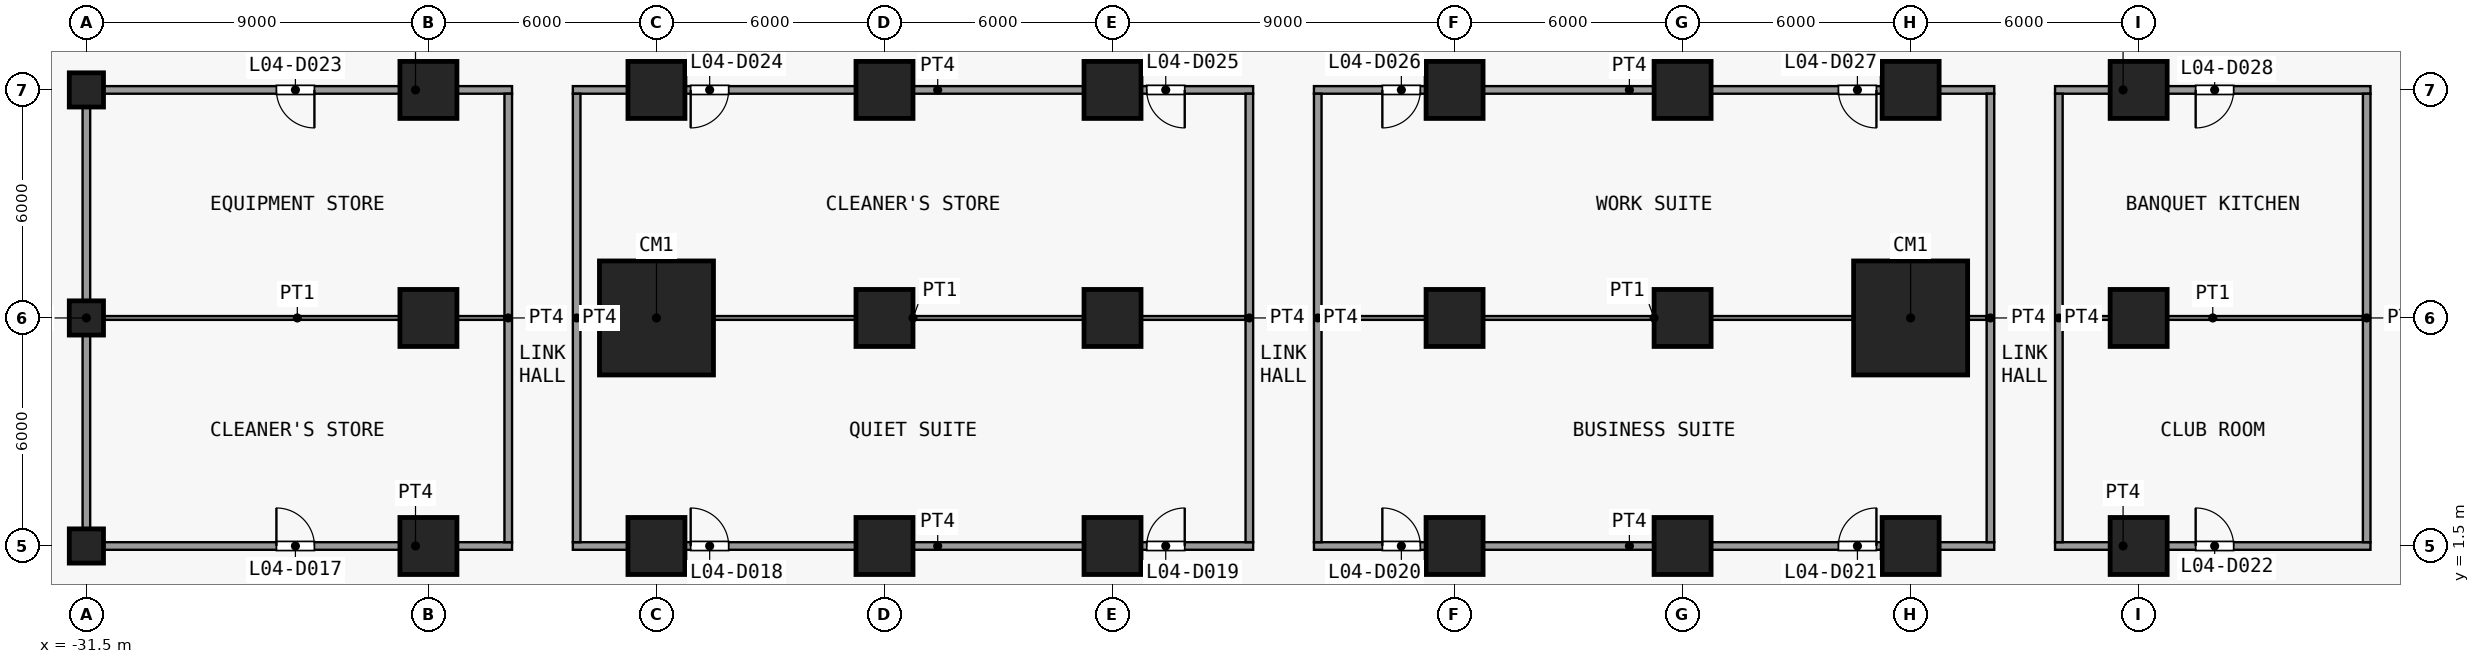
"""IFC4 building model, lengths in metres.
Left out: names, types, materials, properties, quantities, classifications, styles, units other than length and angle.
Written with IfcOpenShell. Run it as: python <this file> out.ifc"""

import sys

from ifc_helpers import new_model, si_unit, direction, frame, frame_2d, origin, origin_2d, place, context, subcontext, project, spatial, rectangle, extrude, element, fill, save


model = new_model("IFC4")
c1 = context("Model", 3, precision=1e-05, world=origin(), true_north=direction((0.0, 1.0)))
c2 = subcontext(c1, "Body", "Model", "MODEL_VIEW")
j1 = project(units=[si_unit("LENGTHUNIT", "METRE"), si_unit("PLANEANGLEUNIT", "RADIAN")], contexts=[c1])
p1 = place(None, origin())
s1 = spatial("IfcSite", under=j1, at=p1, CompositionType="ELEMENT")
p2 = place(p1, origin())
s2 = spatial("IfcBuilding", under=s1, at=p2, CompositionType="ELEMENT")
p3 = place(p2, frame((0.0, 0.0, 23.5)))
s3 = spatial("IfcBuildingStorey", under=s2, at=p3, CompositionType="ELEMENT", Elevation=23.5)
for number, where, z_axis, x_axis in (
    (1, (-31.5, 1.5, 0.0), (0.0, 0.0, 1.0), (1.0, 0.0, 0.0)),
    (2, (-31.5, 7.5, 0.0), (0.0, 0.0, 1.0), (1.0, 0.0, 0.0)),
    (3, (-31.5, 13.5, 0.0), (0.0, 0.0, 1.0), (1.0, 0.0, 0.0)),
):
    element("IfcColumn", number, at=place(p3, frame(where, z_axis=z_axis, x_axis=x_axis)), inside=s3, PredefinedType="COLUMN", context=c2, shape_type="SweptSolid", body=[
        extrude(rectangle(XDim=0.9, YDim=0.9, at=origin_2d()), origin(), (0.0, 0.0, 1.0), 4.5),
    ])
for number, where, z_axis, x_axis in (
    (4, (-22.5, 1.5, 0.0), (0.0, 0.0, 1.0), (1.0, 0.0, 0.0)),
    (5, (-22.5, 7.5, 0.0), (0.0, 0.0, 1.0), (1.0, 0.0, 0.0)),
    (6, (-22.5, 13.5, 0.0), (0.0, 0.0, 1.0), (1.0, 0.0, 0.0)),
    (7, (-16.5, 1.5, 0.0), (0.0, 0.0, 1.0), (1.0, 0.0, 0.0)),
):
    element("IfcColumn", number, at=place(p3, frame(where, z_axis=z_axis, x_axis=x_axis)), inside=s3, PredefinedType="COLUMN", context=c2, shape_type="SweptSolid", body=[
        extrude(rectangle(XDim=1.5, YDim=1.5, at=origin_2d()), origin(), (0.0, 0.0, 1.0), 4.5),
    ])
p4 = place(p3, frame((-16.5, 7.5, 0.0), z_axis=(0.0, 0.0, 1.0), x_axis=(1.0, 0.0, 0.0)))
e8 = element("IfcColumn", 8, at=p4, inside=s3, PredefinedType="COLUMN", context=c2, shape_type="SweptSolid", body=[
    extrude(rectangle(XDim=3.0, YDim=3.0, at=origin_2d()), origin(), (0.0, 0.0, 1.0), 4.5),
])
for number, where, z_axis, x_axis in (
    (9, (-16.5, 13.5, 0.0), (0.0, 0.0, 1.0), (1.0, 0.0, 0.0)),
    (10, (-10.5, 1.5, 0.0), (0.0, 0.0, 1.0), (1.0, 0.0, 0.0)),
    (11, (-10.5, 7.5, 0.0), (0.0, 0.0, 1.0), (1.0, 0.0, 0.0)),
    (12, (-10.5, 13.5, 0.0), (0.0, 0.0, 1.0), (1.0, 0.0, 0.0)),
    (13, (-4.5, 1.5, 0.0), (0.0, 0.0, 1.0), (1.0, 0.0, 0.0)),
    (14, (-4.5, 7.5, 0.0), (0.0, 0.0, 1.0), (1.0, 0.0, 0.0)),
    (15, (-4.5, 13.5, 0.0), (0.0, 0.0, 1.0), (1.0, 0.0, 0.0)),
    (16, (4.5, 1.5, 0.0), (0.0, 0.0, 1.0), (1.0, 0.0, 0.0)),
    (17, (4.5, 7.5, 0.0), (0.0, 0.0, 1.0), (1.0, 0.0, 0.0)),
    (18, (4.5, 13.5, 0.0), (0.0, 0.0, 1.0), (1.0, 0.0, 0.0)),
    (19, (10.5, 1.5, 0.0), (0.0, 0.0, 1.0), (1.0, 0.0, 0.0)),
    (20, (10.5, 7.5, 0.0), (0.0, 0.0, 1.0), (1.0, 0.0, 0.0)),
    (21, (10.5, 13.5, 0.0), (0.0, 0.0, 1.0), (1.0, 0.0, 0.0)),
    (22, (16.5, 1.5, 0.0), (0.0, 0.0, 1.0), (1.0, 0.0, 0.0)),
):
    element("IfcColumn", number, at=place(p3, frame(where, z_axis=z_axis, x_axis=x_axis)), inside=s3, PredefinedType="COLUMN", context=c2, shape_type="SweptSolid", body=[
        extrude(rectangle(XDim=1.5, YDim=1.5, at=origin_2d()), origin(), (0.0, 0.0, 1.0), 4.5),
    ])
p5 = place(p3, frame((16.5, 7.5, 0.0), z_axis=(0.0, 0.0, 1.0), x_axis=(1.0, 0.0, 0.0)))
e23 = element("IfcColumn", 23, at=p5, inside=s3, PredefinedType="COLUMN", context=c2, shape_type="SweptSolid", body=[
    extrude(rectangle(XDim=3.0, YDim=3.0, at=origin_2d()), origin(), (0.0, 0.0, 1.0), 4.5),
])
for number, where, z_axis, x_axis in (
    (24, (16.5, 13.5, 0.0), (0.0, 0.0, 1.0), (1.0, 0.0, 0.0)),
    (25, (22.5, 1.5, 0.0), (0.0, 0.0, 1.0), (1.0, 0.0, 0.0)),
    (26, (22.5, 7.5, 0.0), (0.0, 0.0, 1.0), (1.0, 0.0, 0.0)),
    (27, (22.5, 13.5, 0.0), (0.0, 0.0, 1.0), (1.0, 0.0, 0.0)),
):
    element("IfcColumn", number, at=place(p3, frame(where, z_axis=z_axis, x_axis=x_axis)), inside=s3, PredefinedType="COLUMN", context=c2, shape_type="SweptSolid", body=[
        extrude(rectangle(XDim=1.5, YDim=1.5, at=origin_2d()), origin(), (0.0, 0.0, 1.0), 4.5),
    ])
p6 = place(p3, frame((-31.6, 1.5, 0.0), z_axis=(0.0, 0.0, 1.0), x_axis=(1.0, 0.0, 0.0)))
e28 = element("IfcWall", 28, at=p6, inside=s3, PredefinedType="PARTITIONING", context=c2, shape_type="SweptSolid", body=[
    extrude(rectangle(XDim=11.3, YDim=0.2, at=frame_2d((5.65, 0.0))), origin(), (0.0, 0.0, 1.0), 4.15),
])
p7 = place(p6, frame((5.1, 0.0, 0.0)))
e29 = element("IfcOpeningElement", 29, at=p7, cuts=e28, PredefinedType="OPENING", context=c2, shape_type="SweptSolid", body=[
    extrude(rectangle(XDim=1.0, YDim=2.1, at=frame_2d((0.5, 1.05))), frame((0.0, 0.11, 0.0), z_axis=(0.0, -1.0, 0.0), x_axis=(1.0, 0.0, 0.0)), (0.0, 0.0, 1.0), 0.22),
])
p8 = place(p3, frame((-18.7, 1.5, 0.0), z_axis=(0.0, 0.0, 1.0), x_axis=(1.0, 0.0, 0.0)))
e30 = element("IfcWall", 30, at=p8, inside=s3, PredefinedType="PARTITIONING", context=c2, shape_type="SweptSolid", body=[
    extrude(rectangle(XDim=17.9, YDim=0.2, at=frame_2d((8.95, 0.0))), origin(), (0.0, 0.0, 1.0), 4.15),
])
p9 = place(p8, frame((3.1, 0.0, 0.0)))
e31 = element("IfcOpeningElement", 31, at=p9, cuts=e30, PredefinedType="OPENING", context=c2, shape_type="SweptSolid", body=[
    extrude(rectangle(XDim=1.0, YDim=2.1, at=frame_2d((0.5, 1.05))), frame((0.0, 0.11, 0.0), z_axis=(0.0, -1.0, 0.0), x_axis=(1.0, 0.0, 0.0)), (0.0, 0.0, 1.0), 0.22),
])
p10 = place(p8, frame((15.1, 0.0, 0.0)))
e32 = element("IfcOpeningElement", 32, at=p10, cuts=e30, PredefinedType="OPENING", context=c2, shape_type="SweptSolid", body=[
    extrude(rectangle(XDim=1.0, YDim=2.1, at=frame_2d((0.5, 1.05))), frame((0.0, 0.11, 0.0), z_axis=(0.0, -1.0, 0.0), x_axis=(1.0, 0.0, 0.0)), (0.0, 0.0, 1.0), 0.22),
])
p11 = place(p3, frame((0.8, 1.5, 0.0), z_axis=(0.0, 0.0, 1.0), x_axis=(1.0, 0.0, 0.0)))
e33 = element("IfcWall", 33, at=p11, inside=s3, PredefinedType="PARTITIONING", context=c2, shape_type="SweptSolid", body=[
    extrude(rectangle(XDim=17.9, YDim=0.2, at=frame_2d((8.95, 0.0))), origin(), (0.0, 0.0, 1.0), 4.15),
])
p12 = place(p11, frame((1.8, 0.0, 0.0)))
e34 = element("IfcOpeningElement", 34, at=p12, cuts=e33, PredefinedType="OPENING", context=c2, shape_type="SweptSolid", body=[
    extrude(rectangle(XDim=1.0, YDim=2.1, at=frame_2d((0.5, 1.05))), frame((0.0, 0.11, 0.0), z_axis=(0.0, -1.0, 0.0), x_axis=(1.0, 0.0, 0.0)), (0.0, 0.0, 1.0), 0.22),
])
p13 = place(p11, frame((13.8, 0.0, 0.0)))
e35 = element("IfcOpeningElement", 35, at=p13, cuts=e33, PredefinedType="OPENING", context=c2, shape_type="SweptSolid", body=[
    extrude(rectangle(XDim=1.0, YDim=2.1, at=frame_2d((0.5, 1.05))), frame((0.0, 0.11, 0.0), z_axis=(0.0, -1.0, 0.0), x_axis=(1.0, 0.0, 0.0)), (0.0, 0.0, 1.0), 0.22),
])
p14 = place(p3, frame((20.3, 1.5, 0.0), z_axis=(0.0, 0.0, 1.0), x_axis=(1.0, 0.0, 0.0)))
e36 = element("IfcWall", 36, at=p14, inside=s3, PredefinedType="PARTITIONING", context=c2, shape_type="SweptSolid", body=[
    extrude(rectangle(XDim=8.3, YDim=0.2, at=frame_2d((4.15, 0.0))), origin(), (0.0, 0.0, 1.0), 4.15),
])
p15 = place(p14, frame((3.7, 0.0, 0.0)))
e37 = element("IfcOpeningElement", 37, at=p15, cuts=e36, PredefinedType="OPENING", context=c2, shape_type="SweptSolid", body=[
    extrude(rectangle(XDim=1.0, YDim=2.1, at=frame_2d((0.5, 1.05))), frame((0.0, 0.11, 0.0), z_axis=(0.0, -1.0, 0.0), x_axis=(1.0, 0.0, 0.0)), (0.0, 0.0, 1.0), 0.22),
])
p16 = place(p3, frame((-31.4, 7.5, 0.0), z_axis=(0.0, 0.0, 1.0), x_axis=(1.0, 0.0, 0.0)))
e38 = element("IfcWall", 38, at=p16, inside=s3, PredefinedType="PARTITIONING", context=c2, shape_type="SweptSolid", body=[
    extrude(rectangle(XDim=10.9, YDim=0.1, at=frame_2d((5.45, 0.0))), origin(), (0.0, 0.0, 1.0), 4.15),
])
for number, where, z_axis, x_axis in (
    (39, (-18.5, 7.5, 0.0), (0.0, 0.0, 1.0), (1.0, 0.0, 0.0)),
    (40, (1.0, 7.5, 0.0), (0.0, 0.0, 1.0), (1.0, 0.0, 0.0)),
):
    element("IfcWall", number, at=place(p3, frame(where, z_axis=z_axis, x_axis=x_axis)), inside=s3, PredefinedType="PARTITIONING", context=c2, shape_type="SweptSolid", body=[
        extrude(rectangle(XDim=17.5, YDim=0.1, at=frame_2d((8.75, 0.0))), origin(), (0.0, 0.0, 1.0), 4.15),
    ])
p17 = place(p3, frame((20.5, 7.5, 0.0), z_axis=(0.0, 0.0, 1.0), x_axis=(1.0, 0.0, 0.0)))
e41 = element("IfcWall", 41, at=p17, inside=s3, PredefinedType="PARTITIONING", context=c2, shape_type="SweptSolid", body=[
    extrude(rectangle(XDim=7.9, YDim=0.1, at=frame_2d((3.95, 0.0))), origin(), (0.0, 0.0, 1.0), 4.15),
])
p18 = place(p3, frame((-31.6, 13.5, 0.0), z_axis=(0.0, 0.0, 1.0), x_axis=(1.0, 0.0, 0.0)))
e42 = element("IfcWall", 42, at=p18, inside=s3, PredefinedType="PARTITIONING", context=c2, shape_type="SweptSolid", body=[
    extrude(rectangle(XDim=11.3, YDim=0.2, at=frame_2d((5.65, 0.0))), origin(), (0.0, 0.0, 1.0), 4.15),
])
p19 = place(p18, frame((5.1, 0.0, 0.0)))
e43 = element("IfcOpeningElement", 43, at=p19, cuts=e42, PredefinedType="OPENING", context=c2, shape_type="SweptSolid", body=[
    extrude(rectangle(XDim=1.0, YDim=2.1, at=frame_2d((0.5, 1.05))), frame((0.0, 0.11, 0.0), z_axis=(0.0, -1.0, 0.0), x_axis=(1.0, 0.0, 0.0)), (0.0, 0.0, 1.0), 0.22),
])
p20 = place(p3, frame((-18.7, 13.5, 0.0), z_axis=(0.0, 0.0, 1.0), x_axis=(1.0, 0.0, 0.0)))
e44 = element("IfcWall", 44, at=p20, inside=s3, PredefinedType="PARTITIONING", context=c2, shape_type="SweptSolid", body=[
    extrude(rectangle(XDim=17.9, YDim=0.2, at=frame_2d((8.95, 0.0))), origin(), (0.0, 0.0, 1.0), 4.15),
])
p21 = place(p20, frame((3.1, 0.0, 0.0)))
e45 = element("IfcOpeningElement", 45, at=p21, cuts=e44, PredefinedType="OPENING", context=c2, shape_type="SweptSolid", body=[
    extrude(rectangle(XDim=1.0, YDim=2.1, at=frame_2d((0.5, 1.05))), frame((0.0, 0.11, 0.0), z_axis=(0.0, -1.0, 0.0), x_axis=(1.0, 0.0, 0.0)), (0.0, 0.0, 1.0), 0.22),
])
p22 = place(p20, frame((15.1, 0.0, 0.0)))
e46 = element("IfcOpeningElement", 46, at=p22, cuts=e44, PredefinedType="OPENING", context=c2, shape_type="SweptSolid", body=[
    extrude(rectangle(XDim=1.0, YDim=2.1, at=frame_2d((0.5, 1.05))), frame((0.0, 0.11, 0.0), z_axis=(0.0, -1.0, 0.0), x_axis=(1.0, 0.0, 0.0)), (0.0, 0.0, 1.0), 0.22),
])
p23 = place(p3, frame((0.8, 13.5, 0.0), z_axis=(0.0, 0.0, 1.0), x_axis=(1.0, 0.0, 0.0)))
e47 = element("IfcWall", 47, at=p23, inside=s3, PredefinedType="PARTITIONING", context=c2, shape_type="SweptSolid", body=[
    extrude(rectangle(XDim=17.9, YDim=0.2, at=frame_2d((8.95, 0.0))), origin(), (0.0, 0.0, 1.0), 4.15),
])
p24 = place(p23, frame((1.8, 0.0, 0.0)))
e48 = element("IfcOpeningElement", 48, at=p24, cuts=e47, PredefinedType="OPENING", context=c2, shape_type="SweptSolid", body=[
    extrude(rectangle(XDim=1.0, YDim=2.1, at=frame_2d((0.5, 1.05))), frame((0.0, 0.11, 0.0), z_axis=(0.0, -1.0, 0.0), x_axis=(1.0, 0.0, 0.0)), (0.0, 0.0, 1.0), 0.22),
])
p25 = place(p23, frame((13.8, 0.0, 0.0)))
e49 = element("IfcOpeningElement", 49, at=p25, cuts=e47, PredefinedType="OPENING", context=c2, shape_type="SweptSolid", body=[
    extrude(rectangle(XDim=1.0, YDim=2.1, at=frame_2d((0.5, 1.05))), frame((0.0, 0.11, 0.0), z_axis=(0.0, -1.0, 0.0), x_axis=(1.0, 0.0, 0.0)), (0.0, 0.0, 1.0), 0.22),
])
p26 = place(p3, frame((20.3, 13.5, 0.0), z_axis=(0.0, 0.0, 1.0), x_axis=(1.0, 0.0, 0.0)))
e50 = element("IfcWall", 50, at=p26, inside=s3, PredefinedType="PARTITIONING", context=c2, shape_type="SweptSolid", body=[
    extrude(rectangle(XDim=8.3, YDim=0.2, at=frame_2d((4.15, 0.0))), origin(), (0.0, 0.0, 1.0), 4.15),
])
p27 = place(p26, frame((3.7, 0.0, 0.0)))
e51 = element("IfcOpeningElement", 51, at=p27, cuts=e50, PredefinedType="OPENING", context=c2, shape_type="SweptSolid", body=[
    extrude(rectangle(XDim=1.0, YDim=2.1, at=frame_2d((0.5, 1.05))), frame((0.0, 0.11, 0.0), z_axis=(0.0, -1.0, 0.0), x_axis=(1.0, 0.0, 0.0)), (0.0, 0.0, 1.0), 0.22),
])
for number, where, z_axis, x_axis in (
    (52, (-31.5, 1.6, 0.0), (0.0, 0.0, 1.0), (0.0, 1.0, 0.0)),
    (53, (-20.4, 1.6, 0.0), (0.0, 0.0, 1.0), (0.0, 1.0, 0.0)),
    (54, (-18.6, 1.6, 0.0), (0.0, 0.0, 1.0), (0.0, 1.0, 0.0)),
    (55, (-0.9, 1.6, 0.0), (0.0, 0.0, 1.0), (0.0, 1.0, 0.0)),
    (56, (0.9, 1.6, 0.0), (0.0, 0.0, 1.0), (0.0, 1.0, 0.0)),
    (57, (18.6, 1.6, 0.0), (0.0, 0.0, 1.0), (0.0, 1.0, 0.0)),
    (58, (20.4, 1.6, 0.0), (0.0, 0.0, 1.0), (0.0, 1.0, 0.0)),
    (59, (28.5, 1.6, 0.0), (0.0, 0.0, 1.0), (0.0, 1.0, 0.0)),
):
    element("IfcWall", number, at=place(p3, frame(where, z_axis=z_axis, x_axis=x_axis)), inside=s3, PredefinedType="PARTITIONING", context=c2, shape_type="SweptSolid", body=[
        extrude(rectangle(XDim=11.8, YDim=0.2, at=frame_2d((5.9, 0.0))), origin(), (0.0, 0.0, 1.0), 4.15),
    ])
p28 = place(p7, origin())
e60 = element("IfcDoor", 60, at=p28, inside=s3, OperationType="SINGLE_SWING_RIGHT", PredefinedType="DOOR", context=c2, shape_type="SweptSolid", body=[
    extrude(rectangle(XDim=1.0, YDim=2.1, at=frame_2d((0.5, 1.05))), frame((0.0, 0.025, 0.0), z_axis=(0.0, -1.0, 0.0), x_axis=(1.0, 0.0, 0.0)), (0.0, 0.0, 1.0), 0.05),
])
fill(e29, e60)
p29 = place(p9, origin())
e61 = element("IfcDoor", 61, at=p29, inside=s3, OperationType="SINGLE_SWING_RIGHT", PredefinedType="DOOR", context=c2, shape_type="SweptSolid", body=[
    extrude(rectangle(XDim=1.0, YDim=2.1, at=frame_2d((0.5, 1.05))), frame((0.0, 0.025, 0.0), z_axis=(0.0, -1.0, 0.0), x_axis=(1.0, 0.0, 0.0)), (0.0, 0.0, 1.0), 0.05),
])
fill(e31, e61)
p30 = place(p10, origin())
e62 = element("IfcDoor", 62, at=p30, inside=s3, OperationType="SINGLE_SWING_LEFT", PredefinedType="DOOR", context=c2, shape_type="SweptSolid", body=[
    extrude(rectangle(XDim=1.0, YDim=2.1, at=frame_2d((0.5, 1.05))), frame((0.0, 0.025, 0.0), z_axis=(0.0, -1.0, 0.0), x_axis=(1.0, 0.0, 0.0)), (0.0, 0.0, 1.0), 0.05),
])
fill(e32, e62)
p31 = place(p12, origin())
e63 = element("IfcDoor", 63, at=p31, inside=s3, OperationType="SINGLE_SWING_RIGHT", PredefinedType="DOOR", context=c2, shape_type="SweptSolid", body=[
    extrude(rectangle(XDim=1.0, YDim=2.1, at=frame_2d((0.5, 1.05))), frame((0.0, 0.025, 0.0), z_axis=(0.0, -1.0, 0.0), x_axis=(1.0, 0.0, 0.0)), (0.0, 0.0, 1.0), 0.05),
])
fill(e34, e63)
p32 = place(p13, origin())
e64 = element("IfcDoor", 64, at=p32, inside=s3, OperationType="SINGLE_SWING_LEFT", PredefinedType="DOOR", context=c2, shape_type="SweptSolid", body=[
    extrude(rectangle(XDim=1.0, YDim=2.1, at=frame_2d((0.5, 1.05))), frame((0.0, 0.025, 0.0), z_axis=(0.0, -1.0, 0.0), x_axis=(1.0, 0.0, 0.0)), (0.0, 0.0, 1.0), 0.05),
])
fill(e35, e64)
p33 = place(p15, origin())
e65 = element("IfcDoor", 65, at=p33, inside=s3, OperationType="SINGLE_SWING_RIGHT", PredefinedType="DOOR", context=c2, shape_type="SweptSolid", body=[
    extrude(rectangle(XDim=1.0, YDim=2.1, at=frame_2d((0.5, 1.05))), frame((0.0, 0.025, 0.0), z_axis=(0.0, -1.0, 0.0), x_axis=(1.0, 0.0, 0.0)), (0.0, 0.0, 1.0), 0.05),
])
fill(e37, e65)
p34 = place(p19, origin())
e66 = element("IfcDoor", 66, at=p34, inside=s3, OperationType="SINGLE_SWING_RIGHT", PredefinedType="DOOR", context=c2, shape_type="SweptSolid", body=[
    extrude(rectangle(XDim=1.0, YDim=2.1, at=frame_2d((0.5, 1.05))), frame((0.0, 0.025, 0.0), z_axis=(0.0, -1.0, 0.0), x_axis=(1.0, 0.0, 0.0)), (0.0, 0.0, 1.0), 0.05),
])
fill(e43, e66)
p35 = place(p21, origin())
e67 = element("IfcDoor", 67, at=p35, inside=s3, OperationType="SINGLE_SWING_LEFT", PredefinedType="DOOR", context=c2, shape_type="SweptSolid", body=[
    extrude(rectangle(XDim=1.0, YDim=2.1, at=frame_2d((0.5, 1.05))), frame((0.0, 0.025, 0.0), z_axis=(0.0, -1.0, 0.0), x_axis=(1.0, 0.0, 0.0)), (0.0, 0.0, 1.0), 0.05),
])
fill(e45, e67)
p36 = place(p22, origin())
e68 = element("IfcDoor", 68, at=p36, inside=s3, OperationType="SINGLE_SWING_RIGHT", PredefinedType="DOOR", context=c2, shape_type="SweptSolid", body=[
    extrude(rectangle(XDim=1.0, YDim=2.1, at=frame_2d((0.5, 1.05))), frame((0.0, 0.025, 0.0), z_axis=(0.0, -1.0, 0.0), x_axis=(1.0, 0.0, 0.0)), (0.0, 0.0, 1.0), 0.05),
])
fill(e46, e68)
p37 = place(p24, origin())
e69 = element("IfcDoor", 69, at=p37, inside=s3, OperationType="SINGLE_SWING_LEFT", PredefinedType="DOOR", context=c2, shape_type="SweptSolid", body=[
    extrude(rectangle(XDim=1.0, YDim=2.1, at=frame_2d((0.5, 1.05))), frame((0.0, 0.025, 0.0), z_axis=(0.0, -1.0, 0.0), x_axis=(1.0, 0.0, 0.0)), (0.0, 0.0, 1.0), 0.05),
])
fill(e48, e69)
p38 = place(p25, origin())
e70 = element("IfcDoor", 70, at=p38, inside=s3, OperationType="SINGLE_SWING_RIGHT", PredefinedType="DOOR", context=c2, shape_type="SweptSolid", body=[
    extrude(rectangle(XDim=1.0, YDim=2.1, at=frame_2d((0.5, 1.05))), frame((0.0, 0.025, 0.0), z_axis=(0.0, -1.0, 0.0), x_axis=(1.0, 0.0, 0.0)), (0.0, 0.0, 1.0), 0.05),
])
fill(e49, e70)
p39 = place(p27, origin())
e71 = element("IfcDoor", 71, at=p39, inside=s3, OperationType="SINGLE_SWING_LEFT", PredefinedType="DOOR", context=c2, shape_type="SweptSolid", body=[
    extrude(rectangle(XDim=1.0, YDim=2.1, at=frame_2d((0.5, 1.05))), frame((0.0, 0.025, 0.0), z_axis=(0.0, -1.0, 0.0), x_axis=(1.0, 0.0, 0.0)), (0.0, 0.0, 1.0), 0.05),
])
fill(e51, e71)
save(model, sys.argv[1])
